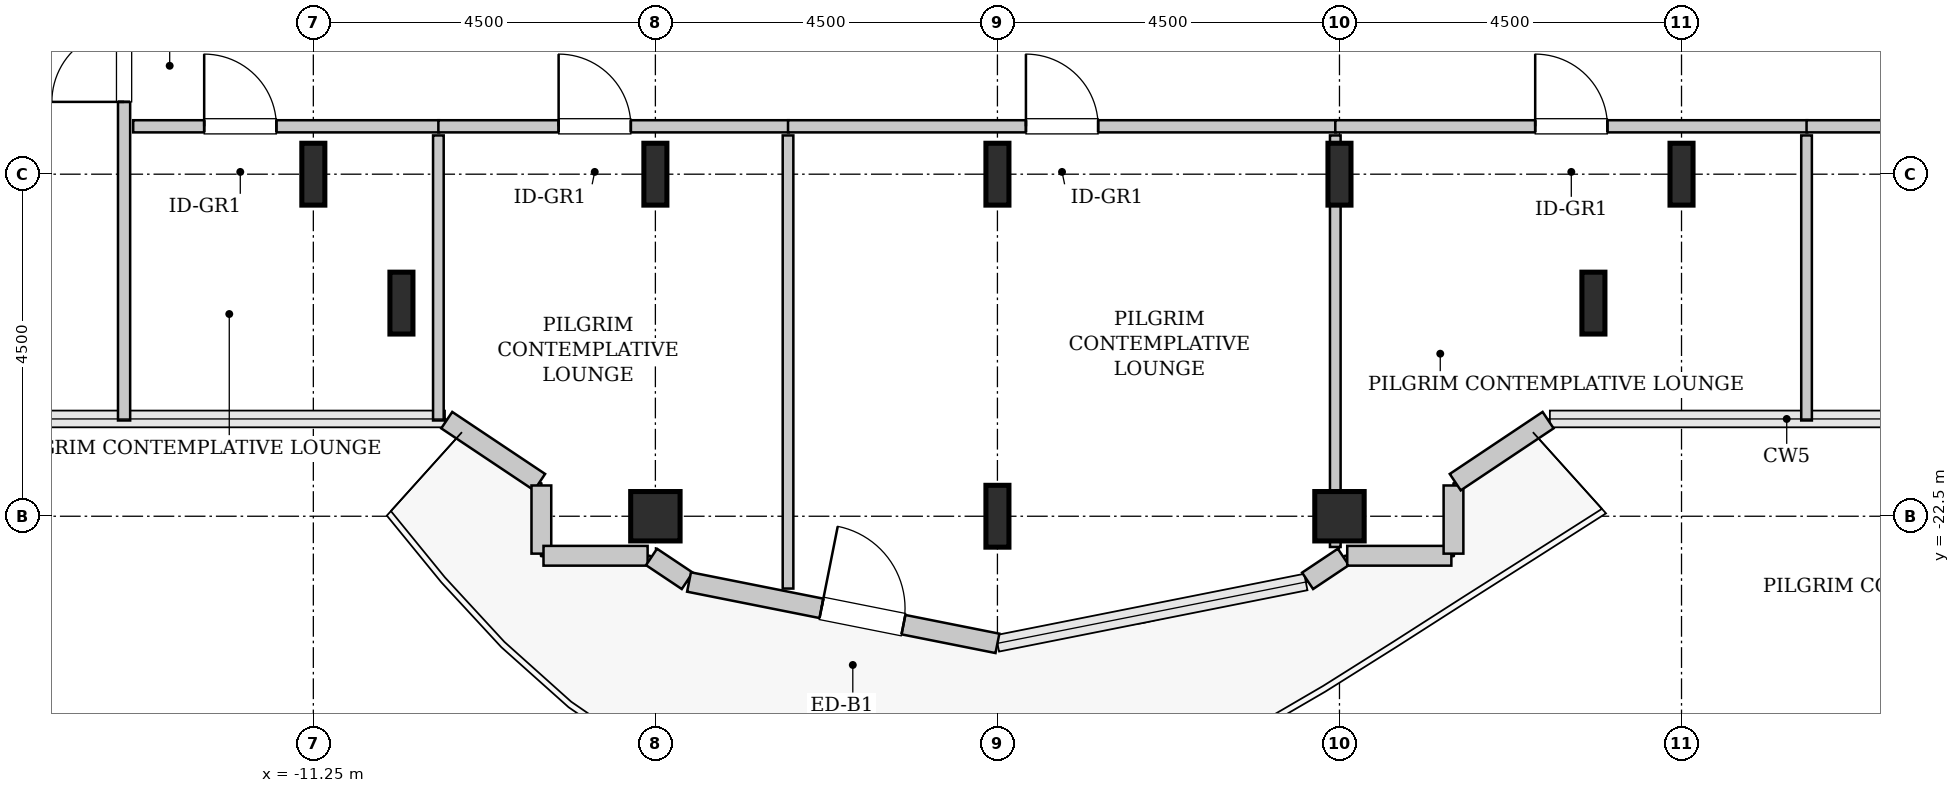
"""IFC4 building model, lengths in metres.
Left out: names, types, materials, properties, quantities, classifications, styles, units other than length and angle.
Written with IfcOpenShell. Run it as: python <this file> out.ifc"""

import sys

from ifc_helpers import new_model, si_unit, direction, frame, frame_2d, origin, origin_2d, place, context, subcontext, project, spatial, rectangle, hollow_rectangle, i_section, extrude, source, transform, mapped, element, fill, save


model = new_model("IFC4")
c1 = context("Model", 3, precision=1e-05, world=origin(), true_north=direction((0.0, 1.0)))
c2 = subcontext(c1, "Body", "Model", "MODEL_VIEW")
j1 = project(units=[si_unit("LENGTHUNIT", "METRE"), si_unit("PLANEANGLEUNIT", "RADIAN")], contexts=[c1])
p1 = place(None, origin())
s1 = spatial("IfcSite", under=j1, at=p1, CompositionType="ELEMENT")
p2 = place(p1, origin())
s2 = spatial("IfcBuilding", under=s1, at=p2, CompositionType="ELEMENT")
p3 = place(p2, frame((0.0, 0.0, 233.2)))
s3 = spatial("IfcBuildingStorey", under=s2, at=p3, CompositionType="ELEMENT", Elevation=233.2)
m1 = source(origin(), c2, "Body", "SweptSolid", [
    extrude(i_section(OverallWidth=0.303, OverallDepth=0.814, WebThickness=0.021, FlangeThickness=0.04, FilletRadius=0.03, at=origin_2d()), origin(), (0.0, 0.0, 1.0), 3.8),
])
for number, where, z_axis, x_axis in (
    (1, (-11.25, -18.0, 0.0), (0.0, 0.0, 1.0), (1.0, 0.0, 0.0)),
    (2, (-10.091, -19.696, 0.0), (0.0, 0.0, 1.0), (1.0, 0.0, 0.0)),
):
    element("IfcColumn", number, at=place(p3, frame(where, z_axis=z_axis, x_axis=x_axis)), inside=s3, PredefinedType="COLUMN", context=c2, shape_type="MappedRepresentation", body=[
        mapped(m1, transform((0.0, 0.0, 0.0), x_axis=(1.0, 0.0, 0.0), y_axis=(0.0, 1.0, 0.0), z_axis=(0.0, 0.0, 1.0), scale=1.0)),
    ])
m2 = source(origin(), c2, "Body", "SweptSolid", [
    extrude(hollow_rectangle(XDim=0.65, YDim=0.65, WallThickness=0.032, InnerFilletRadius=0.032, OuterFilletRadius=0.064, at=origin_2d()), origin(), (0.0, 0.0, 1.0), 3.8),
])
p4 = place(p3, frame((-6.75, -22.5, 0.0), z_axis=(0.0, 0.0, 1.0), x_axis=(1.0, 0.0, 0.0)))
e3 = element("IfcColumn", 3, at=p4, inside=s3, PredefinedType="COLUMN", context=c2, shape_type="MappedRepresentation", body=[
    mapped(m2, transform((0.0, 0.0, 0.0), x_axis=(1.0, 0.0, 0.0), y_axis=(0.0, 1.0, 0.0), z_axis=(0.0, 0.0, 1.0), scale=1.0)),
])
for number, where, z_axis, x_axis in (
    (4, (-6.75, -18.0, 0.0), (0.0, 0.0, 1.0), (1.0, 0.0, 0.0)),
    (5, (-2.25, -22.5, 0.0), (0.0, 0.0, 1.0), (1.0, 0.0, 0.0)),
    (6, (-2.25, -18.0, 0.0), (0.0, 0.0, 1.0), (1.0, 0.0, 0.0)),
):
    element("IfcColumn", number, at=place(p3, frame(where, z_axis=z_axis, x_axis=x_axis)), inside=s3, PredefinedType="COLUMN", context=c2, shape_type="MappedRepresentation", body=[
        mapped(m1, transform((0.0, 0.0, 0.0), x_axis=(1.0, 0.0, 0.0), y_axis=(0.0, 1.0, 0.0), z_axis=(0.0, 0.0, 1.0), scale=1.0)),
    ])
p5 = place(p3, frame((2.25, -22.5, 0.0), z_axis=(0.0, 0.0, 1.0), x_axis=(1.0, 0.0, 0.0)))
e7 = element("IfcColumn", 7, at=p5, inside=s3, PredefinedType="COLUMN", context=c2, shape_type="MappedRepresentation", body=[
    mapped(m2, transform((0.0, 0.0, 0.0), x_axis=(1.0, 0.0, 0.0), y_axis=(0.0, 1.0, 0.0), z_axis=(0.0, 0.0, 1.0), scale=1.0)),
])
for number, where, z_axis, x_axis in (
    (8, (2.25, -18.0, 0.0), (0.0, 0.0, 1.0), (1.0, 0.0, 0.0)),
    (9, (5.591, -19.696, 0.0), (0.0, 0.0, 1.0), (1.0, 0.0, 0.0)),
    (10, (6.75, -18.0, 0.0), (0.0, 0.0, 1.0), (1.0, 0.0, 0.0)),
):
    element("IfcColumn", number, at=place(p3, frame(where, z_axis=z_axis, x_axis=x_axis)), inside=s3, PredefinedType="COLUMN", context=c2, shape_type="MappedRepresentation", body=[
        mapped(m1, transform((0.0, 0.0, 0.0), x_axis=(1.0, 0.0, 0.0), y_axis=(0.0, 1.0, 0.0), z_axis=(0.0, 0.0, 1.0), scale=1.0)),
    ])
m3 = source(origin(), c2, "Body", "SweptSolid", [
    extrude(rectangle(XDim=1.469, YDim=0.26, at=frame_2d((0.734, 0.0))), origin(), (0.0, 0.0, 1.0), 3.55),
])
p6 = place(p3, frame((-9.495, -21.236, 0.0), z_axis=(0.0, 0.0, 1.0), x_axis=(0.831461760506, -0.555581983884, 0.0)))
e11 = element("IfcWall", 11, at=p6, inside=s3, PredefinedType="SOLIDWALL", context=c2, shape_type="MappedRepresentation", body=[
    mapped(m3, transform((0.0, 0.0, 0.0), x_axis=(1.0, 0.0, 0.0), y_axis=(0.0, 1.0, 0.0), z_axis=(0.0, 0.0, 1.0), scale=1.0)),
])
m4 = source(origin(), c2, "Body", "SweptSolid", [
    extrude(rectangle(XDim=0.897, YDim=0.26, at=frame_2d((0.448, 0.0))), origin(), (0.0, 0.0, 1.0), 3.55),
])
p7 = place(p3, frame((-8.25, -22.095, 0.0), z_axis=(0.0, 0.0, 1.0), x_axis=(0.0, -1.0, 0.0)))
e12 = element("IfcWall", 12, at=p7, inside=s3, PredefinedType="SOLIDWALL", context=c2, shape_type="MappedRepresentation", body=[
    mapped(m4, transform((0.0, 0.0, 0.0), x_axis=(1.0, 0.0, 0.0), y_axis=(0.0, 1.0, 0.0), z_axis=(0.0, 0.0, 1.0), scale=1.0)),
])
m5 = source(origin(), c2, "Body", "SweptSolid", [
    extrude(rectangle(XDim=1.37, YDim=0.26, at=frame_2d((0.685, 0.0))), origin(), (0.0, 0.0, 1.0), 3.55),
])
p8 = place(p3, frame((-8.222, -23.02, 0.0), z_axis=(0.0, 0.0, 1.0), x_axis=(1.0, 0.0, 0.0)))
e13 = element("IfcWall", 13, at=p8, inside=s3, PredefinedType="SOLIDWALL", context=c2, shape_type="MappedRepresentation", body=[
    mapped(m5, transform((0.0, 0.0, 0.0), x_axis=(1.0, 0.0, 0.0), y_axis=(0.0, 1.0, 0.0), z_axis=(0.0, 0.0, 1.0), scale=1.0)),
])
m6 = source(origin(), c2, "Body", "SweptSolid", [
    extrude(rectangle(XDim=0.565, YDim=0.26, at=frame_2d((0.283, 0.0))), origin(), (0.0, 0.0, 1.0), 3.55),
])
p9 = place(p3, frame((-6.801, -23.036, 0.0), z_axis=(0.0, 0.0, 1.0), x_axis=(0.831651492666, -0.555297933317, 0.0)))
e14 = element("IfcWall", 14, at=p9, inside=s3, PredefinedType="SOLIDWALL", context=c2, shape_type="MappedRepresentation", body=[
    mapped(m6, transform((0.0, 0.0, 0.0), x_axis=(1.0, 0.0, 0.0), y_axis=(0.0, 1.0, 0.0), z_axis=(0.0, 0.0, 1.0), scale=1.0)),
])
m7 = source(origin(), c2, "Body", "SweptSolid", [
    extrude(rectangle(XDim=4.137, YDim=0.26, at=frame_2d((2.068, 0.0))), origin(), (0.0, 0.0, 1.0), 3.55),
])
p10 = place(p3, frame((-6.307, -23.365, 0.0), z_axis=(0.0, 0.0, 1.0), x_axis=(0.980782170794, -0.195105954428, 0.0)))
e15 = element("IfcWall", 15, at=p10, inside=s3, PredefinedType="SOLIDWALL", context=c2, shape_type="MappedRepresentation", body=[
    mapped(m7, transform((0.0, 0.0, 0.0), x_axis=(1.0, 0.0, 0.0), y_axis=(0.0, 1.0, 0.0), z_axis=(0.0, 0.0, 1.0), scale=1.0)),
])
p11 = place(p10, frame((1.776, 0.0, 0.0)))
e16 = element("IfcOpeningElement", 16, at=p11, cuts=e15, PredefinedType="OPENING", context=c2, shape_type="SweptSolid", body=[
    extrude(rectangle(XDim=1.1, YDim=2.2, at=frame_2d((0.55, 1.1))), frame((0.0, 0.14, 0.0), z_axis=(0.0, -1.0, 0.0), x_axis=(1.0, 0.0, 0.0)), (0.0, 0.0, 1.0), 0.28),
])
p12 = place(p3, frame((1.831, -23.35, 0.0), z_axis=(0.0, 0.0, 1.0), x_axis=(0.831651492666, 0.555297933317, 0.0)))
e17 = element("IfcWall", 17, at=p12, inside=s3, PredefinedType="SOLIDWALL", context=c2, shape_type="MappedRepresentation", body=[
    mapped(m6, transform((0.0, 0.0, 0.0), x_axis=(1.0, 0.0, 0.0), y_axis=(0.0, 1.0, 0.0), z_axis=(0.0, 0.0, 1.0), scale=1.0)),
])
p13 = place(p3, frame((2.352, -23.02, 0.0), z_axis=(0.0, 0.0, 1.0), x_axis=(1.0, 0.0, 0.0)))
e18 = element("IfcWall", 18, at=p13, inside=s3, PredefinedType="SOLIDWALL", context=c2, shape_type="MappedRepresentation", body=[
    mapped(m5, transform((0.0, 0.0, 0.0), x_axis=(1.0, 0.0, 0.0), y_axis=(0.0, 1.0, 0.0), z_axis=(0.0, 0.0, 1.0), scale=1.0)),
])
p14 = place(p3, frame((3.75, -22.992, 0.0), z_axis=(0.0, 0.0, 1.0), x_axis=(0.0, 1.0, 0.0)))
e19 = element("IfcWall", 19, at=p14, inside=s3, PredefinedType="SOLIDWALL", context=c2, shape_type="MappedRepresentation", body=[
    mapped(m4, transform((0.0, 0.0, 0.0), x_axis=(1.0, 0.0, 0.0), y_axis=(0.0, 1.0, 0.0), z_axis=(0.0, 0.0, 1.0), scale=1.0)),
])
p15 = place(p3, frame((3.773, -22.052, 0.0), z_axis=(0.0, 0.0, 1.0), x_axis=(0.831461760506, 0.555581983884, 0.0)))
e20 = element("IfcWall", 20, at=p15, inside=s3, PredefinedType="SOLIDWALL", context=c2, shape_type="MappedRepresentation", body=[
    mapped(m3, transform((0.0, 0.0, 0.0), x_axis=(1.0, 0.0, 0.0), y_axis=(0.0, 1.0, 0.0), z_axis=(0.0, 0.0, 1.0), scale=1.0)),
])
m8 = source(origin(), c2, "Body", "SweptSolid", [
    extrude(rectangle(XDim=5.502, YDim=0.16, at=frame_2d((2.751, 0.0))), origin(), (0.0, 0.0, 1.0), 3.535),
])
p16 = place(p3, frame((-13.74, -21.24, 0.0), z_axis=(0.0, 0.0, 1.0), x_axis=(0.0, 1.0, 0.0)))
e21 = element("IfcWall", 21, at=p16, inside=s3, PredefinedType="PARTITIONING", context=c2, shape_type="MappedRepresentation", body=[
    mapped(m8, transform((0.0, 0.0, 0.0), x_axis=(1.0, 0.0, 0.0), y_axis=(0.0, 1.0, 0.0), z_axis=(0.0, 0.0, 1.0), scale=1.0)),
])
p17 = place(p16, frame((4.191, 0.0, 0.0)))
e22 = element("IfcOpeningElement", 22, at=p17, cuts=e21, PredefinedType="OPENING", context=c2, shape_type="SweptSolid", body=[
    extrude(rectangle(XDim=0.95, YDim=2.1, at=frame_2d((0.475, 1.05))), frame((0.0, 0.09, 0.0), z_axis=(0.0, -1.0, 0.0), x_axis=(1.0, 0.0, 0.0)), (0.0, 0.0, 1.0), 0.18),
])
m9 = source(origin(), c2, "Body", "SweptSolid", [
    extrude(rectangle(XDim=4.025, YDim=0.16, at=frame_2d((2.013, 0.0))), origin(), (0.0, 0.0, 1.0), 3.535),
])
p18 = place(p3, frame((-13.62, -17.37, 0.0), z_axis=(0.0, 0.0, 1.0), x_axis=(1.0, 0.0, 0.0)))
e23 = element("IfcWall", 23, at=p18, inside=s3, PredefinedType="PARTITIONING", context=c2, shape_type="MappedRepresentation", body=[
    mapped(m9, transform((0.0, 0.0, 0.0), x_axis=(1.0, 0.0, 0.0), y_axis=(0.0, 1.0, 0.0), z_axis=(0.0, 0.0, 1.0), scale=1.0)),
])
p19 = place(p18, frame((0.934, 0.0, 0.0)))
e24 = element("IfcOpeningElement", 24, at=p19, cuts=e23, PredefinedType="OPENING", context=c2, shape_type="SweptSolid", body=[
    extrude(rectangle(XDim=0.95, YDim=2.1, at=frame_2d((0.475, 1.05))), frame((0.0, 0.09, 0.0), z_axis=(0.0, -1.0, 0.0), x_axis=(1.0, 0.0, 0.0)), (0.0, 0.0, 1.0), 0.18),
])
m10 = source(origin(), c2, "Body", "SweptSolid", [
    extrude(rectangle(XDim=3.75, YDim=0.14, at=frame_2d((1.875, 0.0))), origin(), (0.0, 0.0, 1.0), 3.535),
])
p20 = place(p3, frame((-9.605, -21.24, 0.0), z_axis=(0.0, 0.0, 1.0), x_axis=(0.0, 1.0, 0.0)))
e25 = element("IfcWall", 25, at=p20, inside=s3, PredefinedType="PARTITIONING", context=c2, shape_type="MappedRepresentation", body=[
    mapped(m10, transform((0.0, 0.0, 0.0), x_axis=(1.0, 0.0, 0.0), y_axis=(0.0, 1.0, 0.0), z_axis=(0.0, 0.0, 1.0), scale=1.0)),
])
m11 = source(origin(), c2, "Body", "SweptSolid", [
    extrude(rectangle(XDim=4.61, YDim=0.16, at=frame_2d((2.305, 0.0))), origin(), (0.0, 0.0, 1.0), 3.535),
])
p21 = place(p3, frame((-9.605, -17.37, 0.0), z_axis=(0.0, 0.0, 1.0), x_axis=(1.0, 0.0, 0.0)))
e26 = element("IfcWall", 26, at=p21, inside=s3, PredefinedType="PARTITIONING", context=c2, shape_type="MappedRepresentation", body=[
    mapped(m11, transform((0.0, 0.0, 0.0), x_axis=(1.0, 0.0, 0.0), y_axis=(0.0, 1.0, 0.0), z_axis=(0.0, 0.0, 1.0), scale=1.0)),
])
p22 = place(p21, frame((1.582, 0.0, 0.0)))
e27 = element("IfcOpeningElement", 27, at=p22, cuts=e26, PredefinedType="OPENING", context=c2, shape_type="SweptSolid", body=[
    extrude(rectangle(XDim=0.95, YDim=2.1, at=frame_2d((0.475, 1.05))), frame((0.0, 0.09, 0.0), z_axis=(0.0, -1.0, 0.0), x_axis=(1.0, 0.0, 0.0)), (0.0, 0.0, 1.0), 0.18),
])
m12 = source(origin(), c2, "Body", "SweptSolid", [
    extrude(rectangle(XDim=5.961, YDim=0.14, at=frame_2d((2.981, 0.0))), origin(), (0.0, 0.0, 1.0), 3.535),
])
p23 = place(p3, frame((-5.005, -23.451, 0.0), z_axis=(0.0, 0.0, 1.0), x_axis=(0.0, 1.0, 0.0)))
e28 = element("IfcWall", 28, at=p23, inside=s3, PredefinedType="PARTITIONING", context=c2, shape_type="MappedRepresentation", body=[
    mapped(m12, transform((0.0, 0.0, 0.0), x_axis=(1.0, 0.0, 0.0), y_axis=(0.0, 1.0, 0.0), z_axis=(0.0, 0.0, 1.0), scale=1.0)),
])
m13 = source(origin(), c2, "Body", "SweptSolid", [
    extrude(rectangle(XDim=7.21, YDim=0.16, at=frame_2d((3.605, 0.0))), origin(), (0.0, 0.0, 1.0), 3.535),
])
p24 = place(p3, frame((-5.005, -17.37, 0.0), z_axis=(0.0, 0.0, 1.0), x_axis=(1.0, 0.0, 0.0)))
e29 = element("IfcWall", 29, at=p24, inside=s3, PredefinedType="PARTITIONING", context=c2, shape_type="MappedRepresentation", body=[
    mapped(m13, transform((0.0, 0.0, 0.0), x_axis=(1.0, 0.0, 0.0), y_axis=(0.0, 1.0, 0.0), z_axis=(0.0, 0.0, 1.0), scale=1.0)),
])
p25 = place(p24, frame((3.13, 0.0, 0.0)))
e30 = element("IfcOpeningElement", 30, at=p25, cuts=e29, PredefinedType="OPENING", context=c2, shape_type="SweptSolid", body=[
    extrude(rectangle(XDim=0.95, YDim=2.1, at=frame_2d((0.475, 1.05))), frame((0.0, 0.09, 0.0), z_axis=(0.0, -1.0, 0.0), x_axis=(1.0, 0.0, 0.0)), (0.0, 0.0, 1.0), 0.18),
])
m14 = source(origin(), c2, "Body", "SweptSolid", [
    extrude(rectangle(XDim=5.414, YDim=0.14, at=frame_2d((2.707, 0.0))), origin(), (0.0, 0.0, 1.0), 2.925),
])
p26 = place(p3, frame((2.195, -22.904, 0.0), z_axis=(0.0, 0.0, 1.0), x_axis=(0.0, 1.0, 0.0)))
e31 = element("IfcWall", 31, at=p26, inside=s3, PredefinedType="PARTITIONING", context=c2, shape_type="MappedRepresentation", body=[
    mapped(m14, transform((0.0, 0.0, 0.0), x_axis=(1.0, 0.0, 0.0), y_axis=(0.0, 1.0, 0.0), z_axis=(0.0, 0.0, 1.0), scale=1.0)),
])
m15 = source(origin(), c2, "Body", "SweptSolid", [
    extrude(rectangle(XDim=6.21, YDim=0.16, at=frame_2d((3.105, 0.0))), origin(), (0.0, 0.0, 1.0), 3.535),
])
p27 = place(p3, frame((2.195, -17.37, 0.0), z_axis=(0.0, 0.0, 1.0), x_axis=(1.0, 0.0, 0.0)))
e32 = element("IfcWall", 32, at=p27, inside=s3, PredefinedType="PARTITIONING", context=c2, shape_type="MappedRepresentation", body=[
    mapped(m15, transform((0.0, 0.0, 0.0), x_axis=(1.0, 0.0, 0.0), y_axis=(0.0, 1.0, 0.0), z_axis=(0.0, 0.0, 1.0), scale=1.0)),
])
p28 = place(p27, frame((2.63, 0.0, 0.0)))
e33 = element("IfcOpeningElement", 33, at=p28, cuts=e32, PredefinedType="OPENING", context=c2, shape_type="SweptSolid", body=[
    extrude(rectangle(XDim=0.95, YDim=2.1, at=frame_2d((0.475, 1.05))), frame((0.0, 0.09, 0.0), z_axis=(0.0, -1.0, 0.0), x_axis=(1.0, 0.0, 0.0)), (0.0, 0.0, 1.0), 0.18),
])
p29 = place(p3, frame((8.395, -21.24, 0.0), z_axis=(0.0, 0.0, 1.0), x_axis=(0.0, 1.0, 0.0)))
e34 = element("IfcWall", 34, at=p29, inside=s3, PredefinedType="PARTITIONING", context=c2, shape_type="MappedRepresentation", body=[
    mapped(m10, transform((0.0, 0.0, 0.0), x_axis=(1.0, 0.0, 0.0), y_axis=(0.0, 1.0, 0.0), z_axis=(0.0, 0.0, 1.0), scale=1.0)),
])
m16 = source(origin(), c2, "Body", "SweptSolid", [
    extrude(rectangle(XDim=5.225, YDim=0.16, at=frame_2d((2.613, 0.0))), origin(), (0.0, 0.0, 1.0), 3.535),
])
p30 = place(p3, frame((8.395, -17.37, 0.0), z_axis=(0.0, 0.0, 1.0), x_axis=(1.0, 0.0, 0.0)))
e35 = element("IfcWall", 35, at=p30, inside=s3, PredefinedType="PARTITIONING", context=c2, shape_type="MappedRepresentation", body=[
    mapped(m16, transform((0.0, 0.0, 0.0), x_axis=(1.0, 0.0, 0.0), y_axis=(0.0, 1.0, 0.0), z_axis=(0.0, 0.0, 1.0), scale=1.0)),
])
p31 = place(p30, frame((1.543, 0.0, 0.0)))
e36 = element("IfcOpeningElement", 36, at=p31, cuts=e35, PredefinedType="OPENING", context=c2, shape_type="SweptSolid", body=[
    extrude(rectangle(XDim=0.95, YDim=2.1, at=frame_2d((0.475, 1.05))), frame((0.0, 0.09, 0.0), z_axis=(0.0, -1.0, 0.0), x_axis=(1.0, 0.0, 0.0)), (0.0, 0.0, 1.0), 0.18),
])
m17 = source(origin(), c2, "Body", "SweptSolid", [
    extrude(rectangle(XDim=1.1, YDim=2.2, at=frame_2d((0.55, 1.1))), frame((0.0, 0.025, 0.0), z_axis=(0.0, -1.0, 0.0), x_axis=(1.0, 0.0, 0.0)), (0.0, 0.0, 1.0), 0.05),
])
p32 = place(p11, origin())
e37 = element("IfcDoor", 37, at=p32, inside=s3, OperationType="SINGLE_SWING_LEFT", PredefinedType="DOOR", context=c2, shape_type="MappedRepresentation", body=[
    mapped(m17, transform((0.0, 0.0, 0.0), x_axis=(1.0, 0.0, 0.0), y_axis=(0.0, 1.0, 0.0), z_axis=(0.0, 0.0, 1.0), scale=1.0)),
])
fill(e16, e37)
m18 = source(origin(), c2, "Body", "SweptSolid", [
    extrude(rectangle(XDim=0.95, YDim=2.1, at=frame_2d((0.475, 1.05))), frame((0.0, 0.025, 0.0), z_axis=(0.0, -1.0, 0.0), x_axis=(1.0, 0.0, 0.0)), (0.0, 0.0, 1.0), 0.05),
])
p33 = place(p17, origin())
e38 = element("IfcDoor", 38, at=p33, inside=s3, OperationType="SINGLE_SWING_LEFT", PredefinedType="DOOR", context=c2, shape_type="MappedRepresentation", body=[
    mapped(m18, transform((0.0, 0.0, 0.0), x_axis=(1.0, 0.0, 0.0), y_axis=(0.0, 1.0, 0.0), z_axis=(0.0, 0.0, 1.0), scale=1.0)),
])
fill(e22, e38)
p34 = place(p19, origin())
e39 = element("IfcDoor", 39, at=p34, inside=s3, OperationType="SINGLE_SWING_LEFT", PredefinedType="DOOR", context=c2, shape_type="MappedRepresentation", body=[
    mapped(m18, transform((0.0, 0.0, 0.0), x_axis=(1.0, 0.0, 0.0), y_axis=(0.0, 1.0, 0.0), z_axis=(0.0, 0.0, 1.0), scale=1.0)),
])
fill(e24, e39)
p35 = place(p22, origin())
e40 = element("IfcDoor", 40, at=p35, inside=s3, OperationType="SINGLE_SWING_LEFT", PredefinedType="DOOR", context=c2, shape_type="MappedRepresentation", body=[
    mapped(m18, transform((0.0, 0.0, 0.0), x_axis=(1.0, 0.0, 0.0), y_axis=(0.0, 1.0, 0.0), z_axis=(0.0, 0.0, 1.0), scale=1.0)),
])
fill(e27, e40)
p36 = place(p25, origin())
e41 = element("IfcDoor", 41, at=p36, inside=s3, OperationType="SINGLE_SWING_LEFT", PredefinedType="DOOR", context=c2, shape_type="MappedRepresentation", body=[
    mapped(m18, transform((0.0, 0.0, 0.0), x_axis=(1.0, 0.0, 0.0), y_axis=(0.0, 1.0, 0.0), z_axis=(0.0, 0.0, 1.0), scale=1.0)),
])
fill(e30, e41)
p37 = place(p28, origin())
e42 = element("IfcDoor", 42, at=p37, inside=s3, OperationType="SINGLE_SWING_LEFT", PredefinedType="DOOR", context=c2, shape_type="MappedRepresentation", body=[
    mapped(m18, transform((0.0, 0.0, 0.0), x_axis=(1.0, 0.0, 0.0), y_axis=(0.0, 1.0, 0.0), z_axis=(0.0, 0.0, 1.0), scale=1.0)),
])
fill(e33, e42)
save(model, sys.argv[1])
